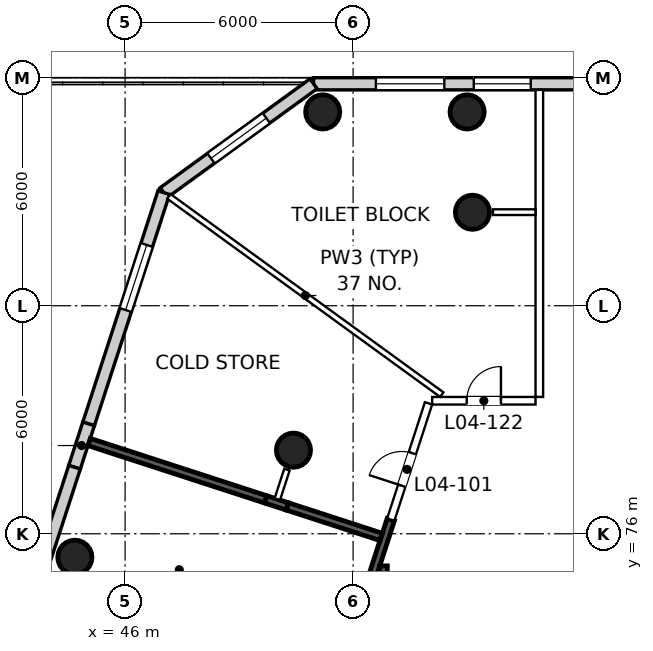
"""IFC4 building model, lengths in metres.
Left out: names, types, materials, properties, quantities, classifications, styles, units other than length and angle.
Written with IfcOpenShell. Run it as: python <this file> out.ifc"""

import sys

from ifc_helpers import new_model, si_unit, direction, frame, frame_2d, origin, origin_2d, place, context, subcontext, project, spatial, rectangle, circle, extrude, element, fill, save


model = new_model("IFC4")
c1 = context("Model", 3, precision=1e-05, world=origin(), true_north=direction((0.0, 1.0)))
c2 = subcontext(c1, "Body", "Model", "MODEL_VIEW")
j1 = project(units=[si_unit("LENGTHUNIT", "METRE"), si_unit("PLANEANGLEUNIT", "RADIAN")], contexts=[c1])
p1 = place(None, origin())
s1 = spatial("IfcSite", under=j1, at=p1, CompositionType="ELEMENT")
p2 = place(p1, origin())
s2 = spatial("IfcBuilding", under=s1, at=p2, CompositionType="ELEMENT")
p3 = place(p2, frame((0.0, 0.0, 29.0)))
s3 = spatial("IfcBuildingStorey", under=s2, at=p3, CompositionType="ELEMENT", Elevation=29.0)
for number, where, z_axis, x_axis in (
    (1, (55.14, 84.46, 0.0), (0.0, 0.0, 1.0), (1.0, 0.0, 0.0)),
    (2, (50.43, 78.2, 0.0), (0.0, 0.0, 1.0), (1.0, 0.0, 0.0)),
    (3, (55.0, 87.1, 0.0), (0.0, 0.0, 1.0), (1.0, 0.0, 0.0)),
    (4, (51.2, 87.1, 0.0), (0.0, 0.0, 1.0), (1.0, 0.0, 0.0)),
    (5, (44.678, 75.382, 0.0), (0.0, 0.0, 1.0), (1.0, 0.0, 0.0)),
):
    element("IfcColumn", number, at=place(p3, frame(where, z_axis=z_axis, x_axis=x_axis)), inside=s3, PredefinedType="COLUMN", context=c2, shape_type="SweptSolid", body=[
        extrude(circle(Radius=0.45, at=origin_2d()), origin(), (0.0, 0.0, 1.0), 5.0),
    ])
p4 = place(p3, frame((59.0, 87.84, 0.0), z_axis=(0.0, 0.0, 1.0), x_axis=(-1.0, 0.0, 0.0)))
e6 = element("IfcWall", 6, at=p4, inside=s3, PredefinedType="SOLIDWALL", context=c2, shape_type="SweptSolid", body=[
    extrude(rectangle(XDim=8.041, YDim=0.32, at=frame_2d((4.021, 0.0))), origin(), (0.0, 0.0, 1.0), 4.65),
])
p5 = place(p4, frame((2.325, 0.0, 0.9)))
e7 = element("IfcOpeningElement", 7, at=p5, cuts=e6, PredefinedType="OPENING", context=c2, shape_type="SweptSolid", body=[
    extrude(rectangle(XDim=1.5, YDim=1.8, at=frame_2d((0.75, 0.9))), frame((0.0, 0.17, 0.0), z_axis=(0.0, -1.0, 0.0), x_axis=(1.0, 0.0, 0.0)), (0.0, 0.0, 1.0), 0.34),
])
p6 = place(p4, frame((4.6, 0.0, 0.9)))
e8 = element("IfcOpeningElement", 8, at=p6, cuts=e6, PredefinedType="OPENING", context=c2, shape_type="SweptSolid", body=[
    extrude(rectangle(XDim=1.8, YDim=2.1, at=frame_2d((0.9, 1.05))), frame((0.0, 0.17, 0.0), z_axis=(0.0, -1.0, 0.0), x_axis=(1.0, 0.0, 0.0)), (0.0, 0.0, 1.0), 0.34),
])
p7 = place(p3, frame((50.959, 87.84, 0.0), z_axis=(0.0, 0.0, 1.0), x_axis=(-0.809004657531, -0.587802232127, 0.0)))
e9 = element("IfcWall", 9, at=p7, inside=s3, PredefinedType="SOLIDWALL", context=c2, shape_type="SweptSolid", body=[
    extrude(rectangle(XDim=4.873, YDim=0.32, at=frame_2d((2.437, 0.0))), origin(), (0.0, 0.0, 1.0), 4.65),
])
p8 = place(p7, frame((1.536, 0.0, 0.9)))
e10 = element("IfcOpeningElement", 10, at=p8, cuts=e9, PredefinedType="OPENING", context=c2, shape_type="SweptSolid", body=[
    extrude(rectangle(XDim=1.8, YDim=2.1, at=frame_2d((0.9, 1.05))), frame((0.0, 0.17, 0.0), z_axis=(0.0, -1.0, 0.0), x_axis=(1.0, 0.0, 0.0)), (0.0, 0.0, 1.0), 0.34),
])
p9 = place(p3, frame((47.017, 84.976, 0.0), z_axis=(0.0, 0.0, 1.0), x_axis=(-0.309028251378, -0.9510528586, 0.0)))
e11 = element("IfcWall", 11, at=p9, inside=s3, PredefinedType="SOLIDWALL", context=c2, shape_type="SweptSolid", body=[
    extrude(rectangle(XDim=6.397, YDim=0.32, at=frame_2d((3.198, 0.0))), origin(), (0.0, 0.0, 1.0), 4.65),
])
p10 = place(p9, frame((1.447, 0.0, 0.9)))
e12 = element("IfcOpeningElement", 12, at=p10, cuts=e11, PredefinedType="OPENING", context=c2, shape_type="SweptSolid", body=[
    extrude(rectangle(XDim=1.8, YDim=2.1, at=frame_2d((0.9, 1.05))), frame((0.0, 0.17, 0.0), z_axis=(0.0, -1.0, 0.0), x_axis=(1.0, 0.0, 0.0)), (0.0, 0.0, 1.0), 0.34),
])
p11 = place(p3, frame((45.04, 78.892, 0.0), z_axis=(0.0, 0.0, 1.0), x_axis=(-0.309017071679, -0.951056491178, 0.0)))
e13 = element("IfcWall", 13, at=p11, inside=s3, PredefinedType="SOLIDWALL", context=c2, shape_type="SweptSolid", body=[
    extrude(rectangle(XDim=1.2, YDim=0.32, at=frame_2d((0.6, 0.0))), origin(), (0.0, 0.0, 1.0), 4.65),
])
p12 = place(p3, frame((44.669, 77.751, 0.0), z_axis=(0.0, 0.0, 1.0), x_axis=(-0.309010726546, -0.951058552813, 0.0)))
e14 = element("IfcWall", 14, at=p12, inside=s3, PredefinedType="SOLIDWALL", context=c2, shape_type="SweptSolid", body=[
    extrude(rectangle(XDim=18.097, YDim=0.32, at=frame_2d((9.049, 0.0))), origin(), (0.0, 0.0, 1.0), 4.65),
])
p13 = place(p12, frame((2.85, 0.0, 0.9)))
e15 = element("IfcOpeningElement", 15, at=p13, cuts=e14, PredefinedType="OPENING", context=c2, shape_type="SweptSolid", body=[
    extrude(rectangle(XDim=1.8, YDim=2.1, at=frame_2d((0.9, 1.05))), frame((0.0, 0.17, 0.0), z_axis=(0.0, -1.0, 0.0), x_axis=(1.0, 0.0, 0.0)), (0.0, 0.0, 1.0), 0.34),
])
p14 = place(p12, frame((5.85, 0.0, 0.9)))
e16 = element("IfcOpeningElement", 16, at=p14, cuts=e14, PredefinedType="OPENING", context=c2, shape_type="SweptSolid", body=[
    extrude(rectangle(XDim=1.8, YDim=2.1, at=frame_2d((0.9, 1.05))), frame((0.0, 0.17, 0.0), z_axis=(0.0, -1.0, 0.0), x_axis=(1.0, 0.0, 0.0)), (0.0, 0.0, 1.0), 0.34),
])
p15 = place(p12, frame((8.85, 0.0, 0.9)))
e17 = element("IfcOpeningElement", 17, at=p15, cuts=e14, PredefinedType="OPENING", context=c2, shape_type="SweptSolid", body=[
    extrude(rectangle(XDim=1.8, YDim=2.1, at=frame_2d((0.9, 1.05))), frame((0.0, 0.17, 0.0), z_axis=(0.0, -1.0, 0.0), x_axis=(1.0, 0.0, 0.0)), (0.0, 0.0, 1.0), 0.34),
])
p16 = place(p12, frame((11.85, 0.0, 0.9)))
e18 = element("IfcOpeningElement", 18, at=p16, cuts=e14, PredefinedType="OPENING", context=c2, shape_type="SweptSolid", body=[
    extrude(rectangle(XDim=1.8, YDim=2.1, at=frame_2d((0.9, 1.05))), frame((0.0, 0.17, 0.0), z_axis=(0.0, -1.0, 0.0), x_axis=(1.0, 0.0, 0.0)), (0.0, 0.0, 1.0), 0.34),
])
p17 = place(p12, frame((14.85, 0.0, 0.9)))
e19 = element("IfcOpeningElement", 19, at=p17, cuts=e14, PredefinedType="OPENING", context=c2, shape_type="SweptSolid", body=[
    extrude(rectangle(XDim=1.8, YDim=2.1, at=frame_2d((0.9, 1.05))), frame((0.0, 0.17, 0.0), z_axis=(0.0, -1.0, 0.0), x_axis=(1.0, 0.0, 0.0)), (0.0, 0.0, 1.0), 0.34),
])
p18 = place(p3, frame((52.496, 74.848, 0.0), z_axis=(0.0, 0.0, 1.0), x_axis=(0.308958737343, 0.95107544318, 0.0)))
e20 = element("IfcWall", 20, at=p18, inside=s3, PredefinedType="PARTITIONING", context=c2, shape_type="SweptSolid", body=[
    extrude(rectangle(XDim=1.604, YDim=0.2, at=frame_2d((0.802, 0.0))), origin(), (0.0, 0.0, 1.0), 4.65),
])
p19 = place(p3, frame((52.991, 76.374, 0.0), z_axis=(0.0, 0.0, 1.0), x_axis=(0.309041420656, 0.951048579369, 0.0)))
e21 = element("IfcWall", 21, at=p19, inside=s3, PredefinedType="PARTITIONING", context=c2, shape_type="SweptSolid", body=[
    extrude(rectangle(XDim=3.215, YDim=0.2, at=frame_2d((1.607, 0.0))), origin(), (0.0, 0.0, 1.0), 4.65),
])
p20 = place(p19, frame((0.938, 0.0, 0.0)))
e22 = element("IfcOpeningElement", 22, at=p20, cuts=e21, PredefinedType="OPENING", context=c2, shape_type="SweptSolid", body=[
    extrude(rectangle(XDim=0.9, YDim=2.1, at=frame_2d((0.45, 1.05))), frame((0.0, 0.11, 0.0), z_axis=(0.0, -1.0, 0.0), x_axis=(1.0, 0.0, 0.0)), (0.0, 0.0, 1.0), 0.22),
])
p21 = place(p3, frame((54.08, 79.5, 0.0), z_axis=(0.0, 0.0, 1.0), x_axis=(1.0, 0.0, 0.0)))
e23 = element("IfcWall", 23, at=p21, inside=s3, PredefinedType="PARTITIONING", context=c2, shape_type="SweptSolid", body=[
    extrude(rectangle(XDim=2.72, YDim=0.2, at=frame_2d((1.36, 0.0))), origin(), (0.0, 0.0, 1.0), 4.65),
])
p22 = place(p21, frame((0.91, 0.0, 0.0)))
e24 = element("IfcOpeningElement", 24, at=p22, cuts=e23, PredefinedType="OPENING", context=c2, shape_type="SweptSolid", body=[
    extrude(rectangle(XDim=0.9, YDim=2.1, at=frame_2d((0.45, 1.05))), frame((0.0, 0.11, 0.0), z_axis=(0.0, -1.0, 0.0), x_axis=(1.0, 0.0, 0.0)), (0.0, 0.0, 1.0), 0.22),
])
p23 = place(p3, frame((56.9, 79.6, 0.0), z_axis=(0.0, 0.0, 1.0), x_axis=(0.0, 1.0, 0.0)))
e25 = element("IfcWall", 25, at=p23, inside=s3, PredefinedType="PARTITIONING", context=c2, shape_type="SweptSolid", body=[
    extrude(rectangle(XDim=8.08, YDim=0.2, at=frame_2d((4.04, 0.0))), origin(), (0.0, 0.0, 1.0), 3.95),
])
p24 = place(p3, frame((47.153, 84.877, 0.0), z_axis=(0.0, 0.0, 1.0), x_axis=(0.809019122312, -0.587782323427, 0.0)))
e26 = element("IfcWall", 26, at=p24, inside=s3, PredefinedType="PARTITIONING", context=c2, shape_type="SweptSolid", body=[
    extrude(rectangle(XDim=8.875, YDim=0.15, at=frame_2d((4.437, 0.0))), origin(), (0.0, 0.0, 1.0), 3.95),
])
p25 = place(p3, frame((45.053, 78.414, 0.0), z_axis=(0.0, 0.0, 1.0), x_axis=(0.95106819954, -0.308981034733, 0.0)))
e27 = element("IfcWall", 27, at=p25, inside=s3, PredefinedType="PARTITIONING", context=c2, shape_type="SweptSolid", body=[
    extrude(rectangle(XDim=4.888, YDim=0.2, at=frame_2d((2.444, 0.0))), origin(), (0.0, 0.0, 1.0), 4.65),
])
p26 = place(p3, frame((49.702, 76.904, 0.0), z_axis=(0.0, 0.0, 1.0), x_axis=(0.951022080269, -0.30912295748, 0.0)))
e28 = element("IfcWall", 28, at=p26, inside=s3, PredefinedType="PARTITIONING", context=c2, shape_type="SweptSolid", body=[
    extrude(rectangle(XDim=0.599, YDim=0.2, at=frame_2d((0.299, 0.0))), origin(), (0.0, 0.0, 1.0), 3.95),
])
p27 = place(p3, frame((50.271, 76.719, 0.0), z_axis=(0.0, 0.0, 1.0), x_axis=(0.951047211668, -0.309045629606, 0.0)))
e29 = element("IfcWall", 29, at=p27, inside=s3, PredefinedType="PARTITIONING", context=c2, shape_type="SweptSolid", body=[
    extrude(rectangle(XDim=2.594, YDim=0.2, at=frame_2d((1.297, 0.0))), origin(), (0.0, 0.0, 1.0), 4.65),
])
p28 = place(p3, frame((52.8, 64.875, 0.0), z_axis=(0.0, 0.0, 1.0), x_axis=(0.0, 1.0, 0.0)))
e30 = element("IfcWall", 30, at=p28, inside=s3, PredefinedType="PARTITIONING", context=c2, shape_type="SweptSolid", body=[
    extrude(rectangle(XDim=10.28, YDim=0.2, at=frame_2d((5.14, 0.0))), origin(), (0.0, 0.0, 1.0), 4.65),
])
p29 = place(p28, frame((4.555, 0.0, 0.0)))
e31 = element("IfcOpeningElement", 31, at=p29, cuts=e30, PredefinedType="OPENING", context=c2, shape_type="SweptSolid", body=[
    extrude(rectangle(XDim=1.8, YDim=2.1, at=frame_2d((0.9, 1.05))), frame((0.0, 0.11, 0.0), z_axis=(0.0, -1.0, 0.0), x_axis=(1.0, 0.0, 0.0)), (0.0, 0.0, 1.0), 0.22),
])
p30 = place(p3, frame((55.68, 84.462, 0.0), z_axis=(0.0, 0.0, 1.0), x_axis=(1.0, 0.0, 0.0)))
e32 = element("IfcWall", 32, at=p30, inside=s3, PredefinedType="PARTITIONING", context=c2, shape_type="SweptSolid", body=[
    extrude(rectangle(XDim=1.12, YDim=0.15, at=frame_2d((0.56, 0.0))), origin(), (0.0, 0.0, 1.0), 3.95),
])
p31 = place(p3, frame((50.259, 77.688, 0.0), z_axis=(0.0, 0.0, 1.0), x_axis=(-0.309052312813, -0.951045039914, 0.0)))
e33 = element("IfcWall", 33, at=p31, inside=s3, PredefinedType="PARTITIONING", context=c2, shape_type="SweptSolid", body=[
    extrude(rectangle(XDim=0.818, YDim=0.15, at=frame_2d((0.409, 0.0))), origin(), (0.0, 0.0, 1.0), 3.95),
])
p32 = place(p5, origin())
e34 = element("IfcWindow", 34, at=p32, inside=s3, PartitioningType="SINGLE_PANEL", PredefinedType="WINDOW", context=c2, shape_type="SweptSolid", body=[
    extrude(rectangle(XDim=1.5, YDim=1.8, at=frame_2d((0.75, 0.9))), frame((0.0, 0.07, 0.0), z_axis=(0.0, -1.0, 0.0), x_axis=(1.0, 0.0, 0.0)), (0.0, 0.0, 1.0), 0.06),
])
fill(e7, e34)
p33 = place(p6, origin())
e35 = element("IfcWindow", 35, at=p33, inside=s3, PartitioningType="SINGLE_PANEL", PredefinedType="WINDOW", context=c2, shape_type="SweptSolid", body=[
    extrude(rectangle(XDim=1.8, YDim=2.1, at=frame_2d((0.9, 1.05))), frame((0.0, 0.07, 0.0), z_axis=(0.0, -1.0, 0.0), x_axis=(1.0, 0.0, 0.0)), (0.0, 0.0, 1.0), 0.06),
])
fill(e8, e35)
p34 = place(p8, origin())
e36 = element("IfcWindow", 36, at=p34, inside=s3, PartitioningType="SINGLE_PANEL", PredefinedType="WINDOW", context=c2, shape_type="SweptSolid", body=[
    extrude(rectangle(XDim=1.8, YDim=2.1, at=frame_2d((0.9, 1.05))), frame((0.0, 0.07, 0.0), z_axis=(0.0, -1.0, 0.0), x_axis=(1.0, 0.0, 0.0)), (0.0, 0.0, 1.0), 0.06),
])
fill(e10, e36)
p35 = place(p10, origin())
e37 = element("IfcWindow", 37, at=p35, inside=s3, PartitioningType="SINGLE_PANEL", PredefinedType="WINDOW", context=c2, shape_type="SweptSolid", body=[
    extrude(rectangle(XDim=1.8, YDim=2.1, at=frame_2d((0.9, 1.05))), frame((0.0, 0.07, 0.0), z_axis=(0.0, -1.0, 0.0), x_axis=(1.0, 0.0, 0.0)), (0.0, 0.0, 1.0), 0.06),
])
fill(e12, e37)
p36 = place(p20, origin())
e38 = element("IfcDoor", 38, at=p36, inside=s3, OperationType="SINGLE_SWING_LEFT", PredefinedType="DOOR", context=c2, shape_type="SweptSolid", body=[
    extrude(rectangle(XDim=0.9, YDim=2.1, at=frame_2d((0.45, 1.05))), frame((0.0, 0.025, 0.0), z_axis=(0.0, -1.0, 0.0), x_axis=(1.0, 0.0, 0.0)), (0.0, 0.0, 1.0), 0.05),
])
fill(e22, e38)
p37 = place(p22, origin())
e39 = element("IfcDoor", 39, at=p37, inside=s3, OperationType="SINGLE_SWING_RIGHT", PredefinedType="DOOR", context=c2, shape_type="SweptSolid", body=[
    extrude(rectangle(XDim=0.9, YDim=2.1, at=frame_2d((0.45, 1.05))), frame((0.0, 0.025, 0.0), z_axis=(0.0, -1.0, 0.0), x_axis=(1.0, 0.0, 0.0)), (0.0, 0.0, 1.0), 0.05),
])
fill(e24, e39)
save(model, sys.argv[1])
